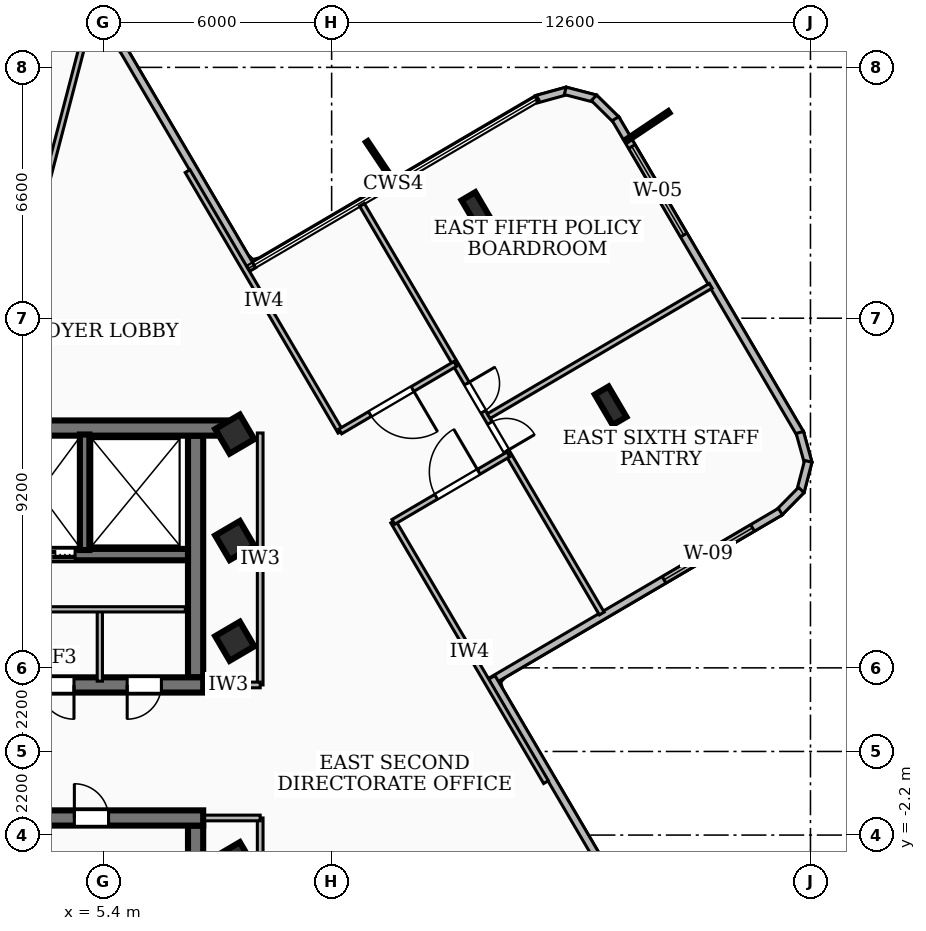
"""IFC4 building model, lengths in metres.
Left out: names, types, materials, properties, quantities, classifications, styles, units other than length and angle.
Written with IfcOpenShell. Run it as: python <this file> out.ifc"""

import sys

from ifc_helpers import new_model, si_unit, direction, frame, frame_2d, origin, origin_2d, place, context, subcontext, project, spatial, rectangle, i_section, extrude, element, fill, save


model = new_model("IFC4")
c1 = context("Model", 3, precision=1e-05, world=origin(), true_north=direction((0.0, 1.0)))
c2 = subcontext(c1, "Body", "Model", "MODEL_VIEW")
j1 = project(units=[si_unit("LENGTHUNIT", "METRE"), si_unit("PLANEANGLEUNIT", "RADIAN")], contexts=[c1])
p1 = place(None, origin())
s1 = spatial("IfcSite", under=j1, at=p1, CompositionType="ELEMENT")
p2 = place(p1, origin())
s2 = spatial("IfcBuilding", under=s1, at=p2, CompositionType="ELEMENT")
p3 = place(p2, frame((0.0, 0.0, 205.2)))
s3 = spatial("IfcBuildingStorey", under=s2, at=p3, CompositionType="ELEMENT", Elevation=205.2)
p4 = place(p3, frame((-8.78, 8.51, 0.0), z_axis=(0.0, 0.0, 1.0), x_axis=(1.0, 0.0, 0.0)))
e1 = element("IfcWall", 1, at=p4, inside=s3, PredefinedType="SHEAR", context=c2, shape_type="SweptSolid", body=[
    extrude(rectangle(XDim=17.56, YDim=0.4, at=frame_2d((8.78, 0.0))), origin(), (0.0, 0.0, 1.0), 3.16),
])
p5 = place(p3, frame((8.02, 1.75, 0.0), z_axis=(0.0, 0.0, 1.0), x_axis=(-1.0, 0.0, 0.0)))
e2 = element("IfcWall", 2, at=p5, inside=s3, PredefinedType="SHEAR", context=c2, shape_type="SweptSolid", body=[
    extrude(rectangle(XDim=16.04, YDim=0.4, at=frame_2d((8.02, 0.0))), origin(), (0.0, 0.0, 1.0), 3.16),
])
p6 = place(p5, frame((7.45, 0.0, 0.0)))
e3 = element("IfcOpeningElement", 3, at=p6, cuts=e2, PredefinedType="OPENING", context=c2, shape_type="SweptSolid", body=[
    extrude(rectangle(XDim=1.0, YDim=2.1, at=frame_2d((0.5, 1.05))), frame((0.0, 0.21, 0.0), z_axis=(0.0, -1.0, 0.0), x_axis=(1.0, 0.0, 0.0)), (0.0, 0.0, 1.0), 0.42),
])
p7 = place(p5, frame((14.285, 0.0, 0.0)))
e4 = element("IfcOpeningElement", 4, at=p7, cuts=e2, PredefinedType="OPENING", context=c2, shape_type="SweptSolid", body=[
    extrude(rectangle(XDim=1.05, YDim=2.15, at=frame_2d((0.525, 1.075))), frame((0.0, 0.21, 0.0), z_axis=(0.0, -1.0, 0.0), x_axis=(1.0, 0.0, 0.0)), (0.0, 0.0, 1.0), 0.42),
])
p8 = place(p5, frame((12.725, 0.0, 0.0)))
e5 = element("IfcOpeningElement", 5, at=p8, cuts=e2, PredefinedType="OPENING", context=c2, shape_type="SweptSolid", body=[
    extrude(rectangle(XDim=1.05, YDim=2.15, at=frame_2d((0.525, 1.075))), frame((0.0, 0.21, 0.0), z_axis=(0.0, -1.0, 0.0), x_axis=(1.0, 0.0, 0.0)), (0.0, 0.0, 1.0), 0.42),
])
p9 = place(p5, frame((11.165, 0.0, 0.0)))
e6 = element("IfcOpeningElement", 6, at=p9, cuts=e2, PredefinedType="OPENING", context=c2, shape_type="SweptSolid", body=[
    extrude(rectangle(XDim=1.05, YDim=2.15, at=frame_2d((0.525, 1.075))), frame((0.0, 0.21, 0.0), z_axis=(0.0, -1.0, 0.0), x_axis=(1.0, 0.0, 0.0)), (0.0, 0.0, 1.0), 0.42),
])
p10 = place(p5, frame((3.4, 0.0, 0.0)))
e7 = element("IfcOpeningElement", 7, at=p10, cuts=e2, PredefinedType="OPENING", context=c2, shape_type="SweptSolid", body=[
    extrude(rectangle(XDim=0.9, YDim=2.06, at=frame_2d((0.45, 1.03))), frame((0.0, 0.21, 0.0), z_axis=(0.0, -1.0, 0.0), x_axis=(1.0, 0.0, 0.0)), (0.0, 0.0, 1.0), 0.42),
])
p11 = place(p5, frame((1.1, 0.0, 0.0)))
e8 = element("IfcOpeningElement", 8, at=p11, cuts=e2, PredefinedType="OPENING", context=c2, shape_type="SweptSolid", body=[
    extrude(rectangle(XDim=0.9, YDim=2.06, at=frame_2d((0.45, 1.03))), frame((0.0, 0.21, 0.0), z_axis=(0.0, -1.0, 0.0), x_axis=(1.0, 0.0, 0.0)), (0.0, 0.0, 1.0), 0.42),
])
p12 = place(p3, frame((7.82, 8.31, 0.0), z_axis=(0.0, 0.0, 1.0), x_axis=(0.0, -1.0, 0.0)))
e9 = element("IfcWall", 9, at=p12, inside=s3, PredefinedType="SHEAR", context=c2, shape_type="SweptSolid", body=[
    extrude(rectangle(XDim=6.36, YDim=0.4, at=frame_2d((3.18, 0.0))), origin(), (0.0, 0.0, 1.0), 3.16),
])
p13 = place(p3, frame((7.62, 5.18, 0.0), z_axis=(0.0, 0.0, 1.0), x_axis=(-1.0, 0.0, 0.0)))
e10 = element("IfcWall", 10, at=p13, inside=s3, PredefinedType="SOLIDWALL", context=c2, shape_type="SweptSolid", body=[
    extrude(rectangle(XDim=15.24, YDim=0.3, at=frame_2d((7.62, 0.0))), origin(), (0.0, 0.0, 1.0), 3.16),
])
p14 = place(p13, frame((5.77, 0.0, 0.0)))
e11 = element("IfcOpeningElement", 11, at=p14, cuts=e10, PredefinedType="OPENING", context=c2, shape_type="SweptSolid", body=[
    extrude(rectangle(XDim=1.1, YDim=2.15, at=frame_2d((0.55, 1.075))), frame((0.0, 0.16, 0.0), z_axis=(0.0, -1.0, 0.0), x_axis=(1.0, 0.0, 0.0)), (0.0, 0.0, 1.0), 0.32),
])
p15 = place(p13, frame((2.97, 0.0, 0.0)))
e12 = element("IfcOpeningElement", 12, at=p15, cuts=e10, PredefinedType="OPENING", context=c2, shape_type="SweptSolid", body=[
    extrude(rectangle(XDim=1.1, YDim=2.15, at=frame_2d((0.55, 1.075))), frame((0.0, 0.16, 0.0), z_axis=(0.0, -1.0, 0.0), x_axis=(1.0, 0.0, 0.0)), (0.0, 0.0, 1.0), 0.32),
])
p16 = place(p13, frame((7.97, 0.0, 0.0)))
e13 = element("IfcOpeningElement", 13, at=p16, cuts=e10, PredefinedType="OPENING", context=c2, shape_type="SweptSolid", body=[
    extrude(rectangle(XDim=1.0, YDim=2.1, at=frame_2d((0.5, 1.05))), frame((0.0, 0.16, 0.0), z_axis=(0.0, -1.0, 0.0), x_axis=(1.0, 0.0, 0.0)), (0.0, 0.0, 1.0), 0.32),
])
p17 = place(p3, frame((-8.02, -1.75, 0.0), z_axis=(0.0, 0.0, 1.0), x_axis=(1.0, 0.0, 0.0)))
e14 = element("IfcWall", 14, at=p17, inside=s3, PredefinedType="SHEAR", context=c2, shape_type="SweptSolid", body=[
    extrude(rectangle(XDim=16.04, YDim=0.4, at=frame_2d((8.02, 0.0))), origin(), (0.0, 0.0, 1.0), 3.16),
])
p18 = place(p17, frame((7.45, 0.0, 0.0)))
e15 = element("IfcOpeningElement", 15, at=p18, cuts=e14, PredefinedType="OPENING", context=c2, shape_type="SweptSolid", body=[
    extrude(rectangle(XDim=1.0, YDim=2.1, at=frame_2d((0.5, 1.05))), frame((0.0, 0.21, 0.0), z_axis=(0.0, -1.0, 0.0), x_axis=(1.0, 0.0, 0.0)), (0.0, 0.0, 1.0), 0.42),
])
p19 = place(p17, frame((12.65, 0.0, 0.0)))
e16 = element("IfcOpeningElement", 16, at=p19, cuts=e14, PredefinedType="OPENING", context=c2, shape_type="SweptSolid", body=[
    extrude(rectangle(XDim=0.9, YDim=2.06, at=frame_2d((0.45, 1.03))), frame((0.0, 0.21, 0.0), z_axis=(0.0, -1.0, 0.0), x_axis=(1.0, 0.0, 0.0)), (0.0, 0.0, 1.0), 0.42),
])
p20 = place(p17, frame((2.25, 0.0, 0.0)))
e17 = element("IfcOpeningElement", 17, at=p20, cuts=e14, PredefinedType="OPENING", context=c2, shape_type="SweptSolid", body=[
    extrude(rectangle(XDim=0.9, YDim=2.06, at=frame_2d((0.45, 1.03))), frame((0.0, 0.21, 0.0), z_axis=(0.0, -1.0, 0.0), x_axis=(1.0, 0.0, 0.0)), (0.0, 0.0, 1.0), 0.42),
])
p21 = place(p3, frame((7.82, -1.95, 0.0), z_axis=(0.0, 0.0, 1.0), x_axis=(0.0, -1.0, 0.0)))
e18 = element("IfcWall", 18, at=p21, inside=s3, PredefinedType="SHEAR", context=c2, shape_type="SweptSolid", body=[
    extrude(rectangle(XDim=6.36, YDim=0.4, at=frame_2d((3.18, 0.0))), origin(), (0.0, 0.0, 1.0), 3.16),
])
p22 = place(p3, frame((4.9, 5.3, 0.0), z_axis=(0.0, 0.0, 1.0), x_axis=(0.0, 1.0, 0.0)))
e19 = element("IfcWall", 19, at=p22, inside=s3, PredefinedType="SOLIDWALL", context=c2, shape_type="SweptSolid", body=[
    extrude(rectangle(XDim=3.04, YDim=0.25, at=frame_2d((1.52, 0.0))), origin(), (0.0, 0.0, 1.0), 3.16),
])
for number, where, z_axis, x_axis in (
    (20, (8.85, -2.9, 0.0), (0.0, 0.0, 1.0), (0.863, 0.506, 0.0)),
    (21, (8.85, 2.9, 0.0), (0.0, 0.0, 1.0), (0.863, 0.506, 0.0)),
    (22, (8.85, 5.55, 0.0), (0.0, 0.0, 1.0), (0.863, 0.506, 0.0)),
    (23, (8.85, 8.35, 0.0), (0.0, 0.0, 1.0), (0.863, 0.506, 0.0)),
):
    element("IfcColumn", number, at=place(p3, frame(where, z_axis=z_axis, x_axis=x_axis)), inside=s3, PredefinedType="COLUMN", context=c2, shape_type="SweptSolid", body=[
        extrude(rectangle(XDim=0.75, YDim=0.75, at=origin_2d()), origin(), (0.0, 0.0, 1.0), 3.42),
    ])
for number, where, z_axis, x_axis in (
    (24, (18.741, 9.097, 0.0), (0.0, 0.0, 1.0), (0.863, 0.506, 0.0)),
    (25, (15.234, 14.209, 0.0), (0.0, 0.0, 1.0), (0.863, 0.506, 0.0)),
):
    element("IfcColumn", number, at=place(p3, frame(where, z_axis=z_axis, x_axis=x_axis)), inside=s3, PredefinedType="COLUMN", context=c2, shape_type="SweptSolid", body=[
        extrude(i_section(OverallWidth=0.418, OverallDepth=0.927, WebThickness=0.019, FlangeThickness=0.032, at=origin_2d()), origin(), (0.0, 0.0, 1.0), 3.42),
    ])
p23 = place(p3, frame((5.338, 19.042, 0.0), z_axis=(0.0, 0.0, 1.0), x_axis=(0.711310891957, -0.702877524881, 0.0)))
e26 = element("IfcWall", 26, at=p23, inside=s3, PredefinedType="SOLIDWALL", context=c2, shape_type="SweptSolid", body=[
    extrude(rectangle(XDim=0.84, YDim=0.2, at=frame_2d((0.42, 0.0))), origin(), (0.0, 0.0, 1.0), 3.16),
])
p24 = place(p3, frame((5.904, 18.492, 0.0), z_axis=(0.0, 0.0, 1.0), x_axis=(0.506017844805, -0.862523008817, 0.0)))
e27 = element("IfcWall", 27, at=p24, inside=s3, PredefinedType="SOLIDWALL", context=c2, shape_type="SweptSolid", body=[
    extrude(rectangle(XDim=6.741, YDim=0.2, at=frame_2d((3.37, 0.0))), origin(), (0.0, 0.0, 1.0), 3.16),
])
p25 = place(p3, frame((16.787, 17.16, 0.0), z_axis=(0.0, 0.0, 1.0), x_axis=(0.963905015631, 0.266246353668, 0.0)))
e28 = element("IfcWall", 28, at=p25, inside=s3, PredefinedType="SOLIDWALL", context=c2, shape_type="SweptSolid", body=[
    extrude(rectangle(XDim=0.838, YDim=0.2, at=frame_2d((0.419, 0.0))), origin(), (0.0, 0.0, 1.0), 3.16),
])
p26 = place(p3, frame((17.547, 17.382, 0.0), z_axis=(0.0, 0.0, 1.0), x_axis=(0.967943577658, -0.251167733737, 0.0)))
e29 = element("IfcWall", 29, at=p26, inside=s3, PredefinedType="SOLIDWALL", context=c2, shape_type="SweptSolid", body=[
    extrude(rectangle(XDim=0.824, YDim=0.2, at=frame_2d((0.412, 0.0))), origin(), (0.0, 0.0, 1.0), 3.16),
])
p27 = place(p3, frame((18.303, 17.199, 0.0), z_axis=(0.0, 0.0, 1.0), x_axis=(0.711894657832, -0.702286263677, 0.0)))
e30 = element("IfcWall", 30, at=p27, inside=s3, PredefinedType="SOLIDWALL", context=c2, shape_type="SweptSolid", body=[
    extrude(rectangle(XDim=0.838, YDim=0.2, at=frame_2d((0.419, 0.0))), origin(), (0.0, 0.0, 1.0), 3.16),
])
p28 = place(p3, frame((18.869, 16.65, 0.0), z_axis=(0.0, 0.0, 1.0), x_axis=(0.505984418435, -0.862542618252, 0.0)))
e31 = element("IfcWall", 31, at=p28, inside=s3, PredefinedType="SOLIDWALL", context=c2, shape_type="SweptSolid", body=[
    extrude(rectangle(XDim=9.625, YDim=0.2, at=frame_2d((4.812, 0.0))), origin(), (0.0, 0.0, 1.0), 3.16),
])
p29 = place(p28, frame((0.85, 0.0, 0.85)))
e32 = element("IfcOpeningElement", 32, at=p29, cuts=e31, PredefinedType="OPENING", context=c2, shape_type="SweptSolid", body=[
    extrude(rectangle(XDim=2.7, YDim=1.85, at=frame_2d((1.35, 0.925))), frame((0.0, 0.11, 0.0), z_axis=(0.0, -1.0, 0.0), x_axis=(1.0, 0.0, 0.0)), (0.0, 0.0, 1.0), 0.22),
])
p30 = place(p3, frame((23.719, 8.394, 0.0), z_axis=(0.0, 0.0, 1.0), x_axis=(0.267253449678, -0.963626272803, 0.0)))
e33 = element("IfcWall", 33, at=p30, inside=s3, PredefinedType="SOLIDWALL", context=c2, shape_type="SweptSolid", body=[
    extrude(rectangle(XDim=0.839, YDim=0.2, at=frame_2d((0.419, 0.0))), origin(), (0.0, 0.0, 1.0), 3.16),
])
p31 = place(p3, frame((23.942, 7.634, 0.0), z_axis=(0.0, 0.0, 1.0), x_axis=(-0.252494280442, -0.967598386906, 0.0)))
e34 = element("IfcWall", 34, at=p31, inside=s3, PredefinedType="SOLIDWALL", context=c2, shape_type="SweptSolid", body=[
    extrude(rectangle(XDim=0.824, YDim=0.2, at=frame_2d((0.412, 0.0))), origin(), (0.0, 0.0, 1.0), 3.16),
])
p32 = place(p3, frame((23.758, 6.879, 0.0), z_axis=(0.0, 0.0, 1.0), x_axis=(-0.701851868682, -0.712322928472, 0.0)))
e35 = element("IfcWall", 35, at=p32, inside=s3, PredefinedType="SOLIDWALL", context=c2, shape_type="SweptSolid", body=[
    extrude(rectangle(XDim=0.839, YDim=0.2, at=frame_2d((0.42, 0.0))), origin(), (0.0, 0.0, 1.0), 3.16),
])
p33 = place(p3, frame((23.209, 6.312, 0.0), z_axis=(0.0, 0.0, 1.0), x_axis=(-0.862602827395, -0.505881766988, 0.0)))
e36 = element("IfcWall", 36, at=p33, inside=s3, PredefinedType="SOLIDWALL", context=c2, shape_type="SweptSolid", body=[
    extrude(rectangle(XDim=8.842, YDim=0.2, at=frame_2d((4.421, 0.0))), origin(), (0.0, 0.0, 1.0), 3.16),
])
p34 = place(p33, frame((0.85, 0.0, 0.85)))
e37 = element("IfcOpeningElement", 37, at=p34, cuts=e36, PredefinedType="OPENING", context=c2, shape_type="SweptSolid", body=[
    extrude(rectangle(XDim=2.7, YDim=1.65, at=frame_2d((1.35, 0.825))), frame((0.0, 0.11, 0.0), z_axis=(0.0, -1.0, 0.0), x_axis=(1.0, 0.0, 0.0)), (0.0, 0.0, 1.0), 0.22),
])
p35 = place(p3, frame((15.611, 1.948, 0.0), z_axis=(0.0, 0.0, 1.0), x_axis=(0.505999167705, -0.862533965872, 0.0)))
e38 = element("IfcWall", 38, at=p35, inside=s3, PredefinedType="SOLIDWALL", context=c2, shape_type="SweptSolid", body=[
    extrude(rectangle(XDim=6.743, YDim=0.2, at=frame_2d((3.372, 0.0))), origin(), (0.0, 0.0, 1.0), 3.16),
])
p36 = place(p3, frame((2.9, 3.74, 0.0), z_axis=(0.0, 0.0, 1.0), x_axis=(1.0, 0.0, 0.0)))
e39 = element("IfcWall", 39, at=p36, inside=s3, PredefinedType="PARTITIONING", context=c2, shape_type="SweptSolid", body=[
    extrude(rectangle(XDim=4.65, YDim=0.138, at=frame_2d((2.325, 0.0))), origin(), (0.0, 0.0, 1.0), 3.16),
])
p37 = place(p3, frame((5.3, 1.85, 0.0), z_axis=(0.0, 0.0, 1.0), x_axis=(0.0, 1.0, 0.0)))
e40 = element("IfcWall", 40, at=p37, inside=s3, PredefinedType="PARTITIONING", context=c2, shape_type="SweptSolid", body=[
    extrude(rectangle(XDim=1.89, YDim=0.138, at=frame_2d((0.945, 0.0))), origin(), (0.0, 0.0, 1.0), 2.39),
])
p38 = place(p3, frame((9.52, 1.75, 0.0), z_axis=(0.0, 0.0, 1.0), x_axis=(0.0, 1.0, 0.0)))
e41 = element("IfcWall", 41, at=p38, inside=s3, PredefinedType="PARTITIONING", context=c2, shape_type="SweptSolid", body=[
    extrude(rectangle(XDim=6.63, YDim=0.15, at=frame_2d((3.315, 0.0))), origin(), (0.0, 0.0, 1.0), 2.53),
])
p39 = place(p3, frame((7.85, 1.75, 0.0), z_axis=(0.0, 0.0, 1.0), x_axis=(1.0, 0.0, 0.0)))
e42 = element("IfcWall", 42, at=p39, inside=s3, PredefinedType="PARTITIONING", context=c2, shape_type="SweptSolid", body=[
    extrude(rectangle(XDim=1.67, YDim=0.15, at=frame_2d((0.835, 0.0))), origin(), (0.0, 0.0, 1.0), 2.39),
])
p40 = place(p3, frame((9.52, -8.38, 0.0), z_axis=(0.0, 0.0, 1.0), x_axis=(0.0, 1.0, 0.0)))
e43 = element("IfcWall", 43, at=p40, inside=s3, PredefinedType="PARTITIONING", context=c2, shape_type="SweptSolid", body=[
    extrude(rectangle(XDim=6.63, YDim=0.15, at=frame_2d((3.315, 0.0))), origin(), (0.0, 0.0, 1.0), 3.16),
])
p41 = place(p3, frame((7.85, -1.75, 0.0), z_axis=(0.0, 0.0, 1.0), x_axis=(1.0, 0.0, 0.0)))
e44 = element("IfcWall", 44, at=p41, inside=s3, PredefinedType="PARTITIONING", context=c2, shape_type="SweptSolid", body=[
    extrude(rectangle(XDim=1.67, YDim=0.15, at=frame_2d((0.835, 0.0))), origin(), (0.0, 0.0, 1.0), 2.39),
])
p42 = place(p3, frame((3.527, 13.54, 0.0), z_axis=(0.0, 0.0, 1.0), x_axis=(0.252132617321, 0.967692690519, 0.0)))
e45 = element("IfcWall", 45, at=p42, inside=s3, PredefinedType="PARTITIONING", context=c2, shape_type="SweptSolid", body=[
    extrude(rectangle(XDim=5.703, YDim=0.145, at=frame_2d((2.852, 0.0))), origin(), (0.0, 0.0, 1.0), 3.16),
])
p43 = place(p3, frame((11.632, 8.413, 0.0), z_axis=(0.0, 0.0, 1.0), x_axis=(-0.506057561451, 0.862499706955, 0.0)))
e46 = element("IfcWall", 46, at=p43, inside=s3, PredefinedType="PARTITIONING", context=c2, shape_type="SweptSolid", body=[
    extrude(rectangle(XDim=7.95, YDim=0.145, at=frame_2d((3.975, 0.0))), origin(), (0.0, 0.0, 1.0), 2.53),
])
p44 = place(p3, frame((17.041, -0.807, 0.0), z_axis=(0.0, 0.0, 1.0), x_axis=(-0.505943324238, 0.862566723598, 0.0)))
e47 = element("IfcWall", 47, at=p44, inside=s3, PredefinedType="PARTITIONING", context=c2, shape_type="SweptSolid", body=[
    extrude(rectangle(XDim=7.949, YDim=0.145, at=frame_2d((3.975, 0.0))), origin(), (0.0, 0.0, 1.0), 3.16),
])
p45 = place(p3, frame((14.654, 10.198, 0.0), z_axis=(0.0, 0.0, 1.0), x_axis=(-0.862375516706, -0.506269165747, 0.0)))
e48 = element("IfcWall", 48, at=p45, inside=s3, PredefinedType="PARTITIONING", context=c2, shape_type="SweptSolid", body=[
    extrude(rectangle(XDim=3.51, YDim=0.145, at=frame_2d((1.755, 0.0))), origin(), (0.0, 0.0, 1.0), 2.53),
])
p46 = place(p45, frame((1.305, 0.0, 0.0)))
e49 = element("IfcOpeningElement", 49, at=p46, cuts=e48, PredefinedType="OPENING", context=c2, shape_type="SweptSolid", body=[
    extrude(rectangle(XDim=1.3, YDim=2.1, at=frame_2d((0.65, 1.05))), frame((0.0, 0.083, 0.0), z_axis=(0.0, -1.0, 0.0), x_axis=(1.0, 0.0, 0.0)), (0.0, 0.0, 1.0), 0.165),
])
p47 = place(p3, frame((13.024, 6.041, 0.0), z_axis=(0.0, 0.0, 1.0), x_axis=(0.862527334663, 0.506010471195, 0.0)))
e50 = element("IfcWall", 50, at=p47, inside=s3, PredefinedType="PARTITIONING", context=c2, shape_type="SweptSolid", body=[
    extrude(rectangle(XDim=3.51, YDim=0.145, at=frame_2d((1.755, 0.0))), origin(), (0.0, 0.0, 1.0), 3.16),
])
p48 = place(p47, frame((1.305, 0.0, 0.0)))
e51 = element("IfcOpeningElement", 51, at=p48, cuts=e50, PredefinedType="OPENING", context=c2, shape_type="SweptSolid", body=[
    extrude(rectangle(XDim=1.3, YDim=2.1, at=frame_2d((0.65, 1.05))), frame((0.0, 0.083, 0.0), z_axis=(0.0, -1.0, 0.0), x_axis=(1.0, 0.0, 0.0)), (0.0, 0.0, 1.0), 0.165),
])
p49 = place(p3, frame((15.531, 8.822, 0.0), z_axis=(0.0, 0.0, 1.0), x_axis=(0.862494081005, 0.506067149923, 0.0)))
e52 = element("IfcWall", 52, at=p49, inside=s3, PredefinedType="PARTITIONING", context=c2, shape_type="SweptSolid", body=[
    extrude(rectangle(XDim=6.776, YDim=0.145, at=frame_2d((3.388, 0.0))), origin(), (0.0, 0.0, 1.0), 2.53),
])
p50 = place(p3, frame((12.198, 14.385, 0.0), z_axis=(0.0, 0.0, 1.0), x_axis=(0.506037527975, -0.862511460956, 0.0)))
e53 = element("IfcWall", 53, at=p50, inside=s3, PredefinedType="PARTITIONING", context=c2, shape_type="SweptSolid", body=[
    extrude(rectangle(XDim=12.469, YDim=0.145, at=frame_2d((6.235, 0.0))), origin(), (0.0, 0.0, 1.0), 2.53),
])
p51 = place(p50, frame((6.655, 0.0, 0.0)))
e54 = element("IfcOpeningElement", 54, at=p51, cuts=e53, PredefinedType="OPENING", context=c2, shape_type="SweptSolid", body=[
    extrude(rectangle(XDim=0.86, YDim=2.04, at=frame_2d((0.43, 1.02))), frame((0.0, 0.083, 0.0), z_axis=(0.0, -1.0, 0.0), x_axis=(1.0, 0.0, 0.0)), (0.0, 0.0, 1.0), 0.165),
])
p52 = place(p50, frame((5.455, 0.0, 0.0)))
e55 = element("IfcOpeningElement", 55, at=p52, cuts=e53, PredefinedType="OPENING", context=c2, shape_type="SweptSolid", body=[
    extrude(rectangle(XDim=0.86, YDim=2.04, at=frame_2d((0.43, 1.02))), frame((0.0, 0.083, 0.0), z_axis=(0.0, -1.0, 0.0), x_axis=(1.0, 0.0, 0.0)), (0.0, 0.0, 1.0), 0.165),
])
p53 = place(p29, origin())
e56 = element("IfcWindow", 56, at=p53, inside=s3, PartitioningType="SINGLE_PANEL", PredefinedType="WINDOW", context=c2, shape_type="SweptSolid", body=[
    extrude(rectangle(XDim=2.7, YDim=1.85, at=frame_2d((1.35, 0.925))), frame((0.0, 0.03, 0.0), z_axis=(0.0, -1.0, 0.0), x_axis=(1.0, 0.0, 0.0)), (0.0, 0.0, 1.0), 0.06),
])
fill(e32, e56)
p54 = place(p34, origin())
e57 = element("IfcWindow", 57, at=p54, inside=s3, PartitioningType="SINGLE_PANEL", PredefinedType="WINDOW", context=c2, shape_type="SweptSolid", body=[
    extrude(rectangle(XDim=2.7, YDim=1.65, at=frame_2d((1.35, 0.825))), frame((0.0, 0.03, 0.0), z_axis=(0.0, -1.0, 0.0), x_axis=(1.0, 0.0, 0.0)), (0.0, 0.0, 1.0), 0.06),
])
fill(e37, e57)
p55 = place(p15, origin())
e58 = element("IfcDoor", 58, at=p55, inside=s3, OperationType="DOUBLE_DOOR_SLIDING", PredefinedType="DOOR", context=c2, shape_type="SweptSolid", body=[
    extrude(rectangle(XDim=1.1, YDim=2.15, at=frame_2d((0.55, 1.075))), frame((0.0, 0.025, 0.0), z_axis=(0.0, -1.0, 0.0), x_axis=(1.0, 0.0, 0.0)), (0.0, 0.0, 1.0), 0.05),
])
fill(e12, e58)
p56 = place(p19, origin())
e59 = element("IfcDoor", 59, at=p56, inside=s3, OperationType="SINGLE_SWING_LEFT", PredefinedType="DOOR", context=c2, shape_type="SweptSolid", body=[
    extrude(rectangle(XDim=0.9, YDim=2.06, at=frame_2d((0.45, 1.03))), frame((0.0, 0.025, 0.0), z_axis=(0.0, -1.0, 0.0), x_axis=(1.0, 0.0, 0.0)), (0.0, 0.0, 1.0), 0.05),
])
fill(e16, e59)
p57 = place(p10, origin())
e60 = element("IfcDoor", 60, at=p57, inside=s3, OperationType="SINGLE_SWING_LEFT", PredefinedType="DOOR", context=c2, shape_type="SweptSolid", body=[
    extrude(rectangle(XDim=0.9, YDim=2.06, at=frame_2d((0.45, 1.03))), frame((0.0, 0.025, 0.0), z_axis=(0.0, -1.0, 0.0), x_axis=(1.0, 0.0, 0.0)), (0.0, 0.0, 1.0), 0.05),
])
fill(e7, e60)
p58 = place(p11, origin())
e61 = element("IfcDoor", 61, at=p58, inside=s3, OperationType="SINGLE_SWING_RIGHT", PredefinedType="DOOR", context=c2, shape_type="SweptSolid", body=[
    extrude(rectangle(XDim=0.9, YDim=2.06, at=frame_2d((0.45, 1.03))), frame((0.0, 0.025, 0.0), z_axis=(0.0, -1.0, 0.0), x_axis=(1.0, 0.0, 0.0)), (0.0, 0.0, 1.0), 0.05),
])
fill(e8, e61)
p59 = place(p46, origin())
e62 = element("IfcDoor", 62, at=p59, inside=s3, OperationType="SINGLE_SWING_LEFT", PredefinedType="DOOR", context=c2, shape_type="SweptSolid", body=[
    extrude(rectangle(XDim=1.3, YDim=2.1, at=frame_2d((0.65, 1.05))), frame((0.0, 0.025, 0.0), z_axis=(0.0, -1.0, 0.0), x_axis=(1.0, 0.0, 0.0)), (0.0, 0.0, 1.0), 0.05),
])
fill(e49, e62)
p60 = place(p48, origin())
e63 = element("IfcDoor", 63, at=p60, inside=s3, OperationType="SINGLE_SWING_RIGHT", PredefinedType="DOOR", context=c2, shape_type="SweptSolid", body=[
    extrude(rectangle(XDim=1.3, YDim=2.1, at=frame_2d((0.65, 1.05))), frame((0.0, 0.025, 0.0), z_axis=(0.0, -1.0, 0.0), x_axis=(1.0, 0.0, 0.0)), (0.0, 0.0, 1.0), 0.05),
])
fill(e51, e63)
p61 = place(p51, origin())
e64 = element("IfcDoor", 64, at=p61, inside=s3, OperationType="SINGLE_SWING_RIGHT", PredefinedType="DOOR", context=c2, shape_type="SweptSolid", body=[
    extrude(rectangle(XDim=0.86, YDim=2.04, at=frame_2d((0.43, 1.02))), frame((0.0, 0.025, 0.0), z_axis=(0.0, -1.0, 0.0), x_axis=(1.0, 0.0, 0.0)), (0.0, 0.0, 1.0), 0.05),
])
fill(e54, e64)
p62 = place(p52, origin())
e65 = element("IfcDoor", 65, at=p62, inside=s3, OperationType="SINGLE_SWING_LEFT", PredefinedType="DOOR", context=c2, shape_type="SweptSolid", body=[
    extrude(rectangle(XDim=0.86, YDim=2.04, at=frame_2d((0.43, 1.02))), frame((0.0, 0.025, 0.0), z_axis=(0.0, -1.0, 0.0), x_axis=(1.0, 0.0, 0.0)), (0.0, 0.0, 1.0), 0.05),
])
fill(e55, e65)
save(model, sys.argv[1])
